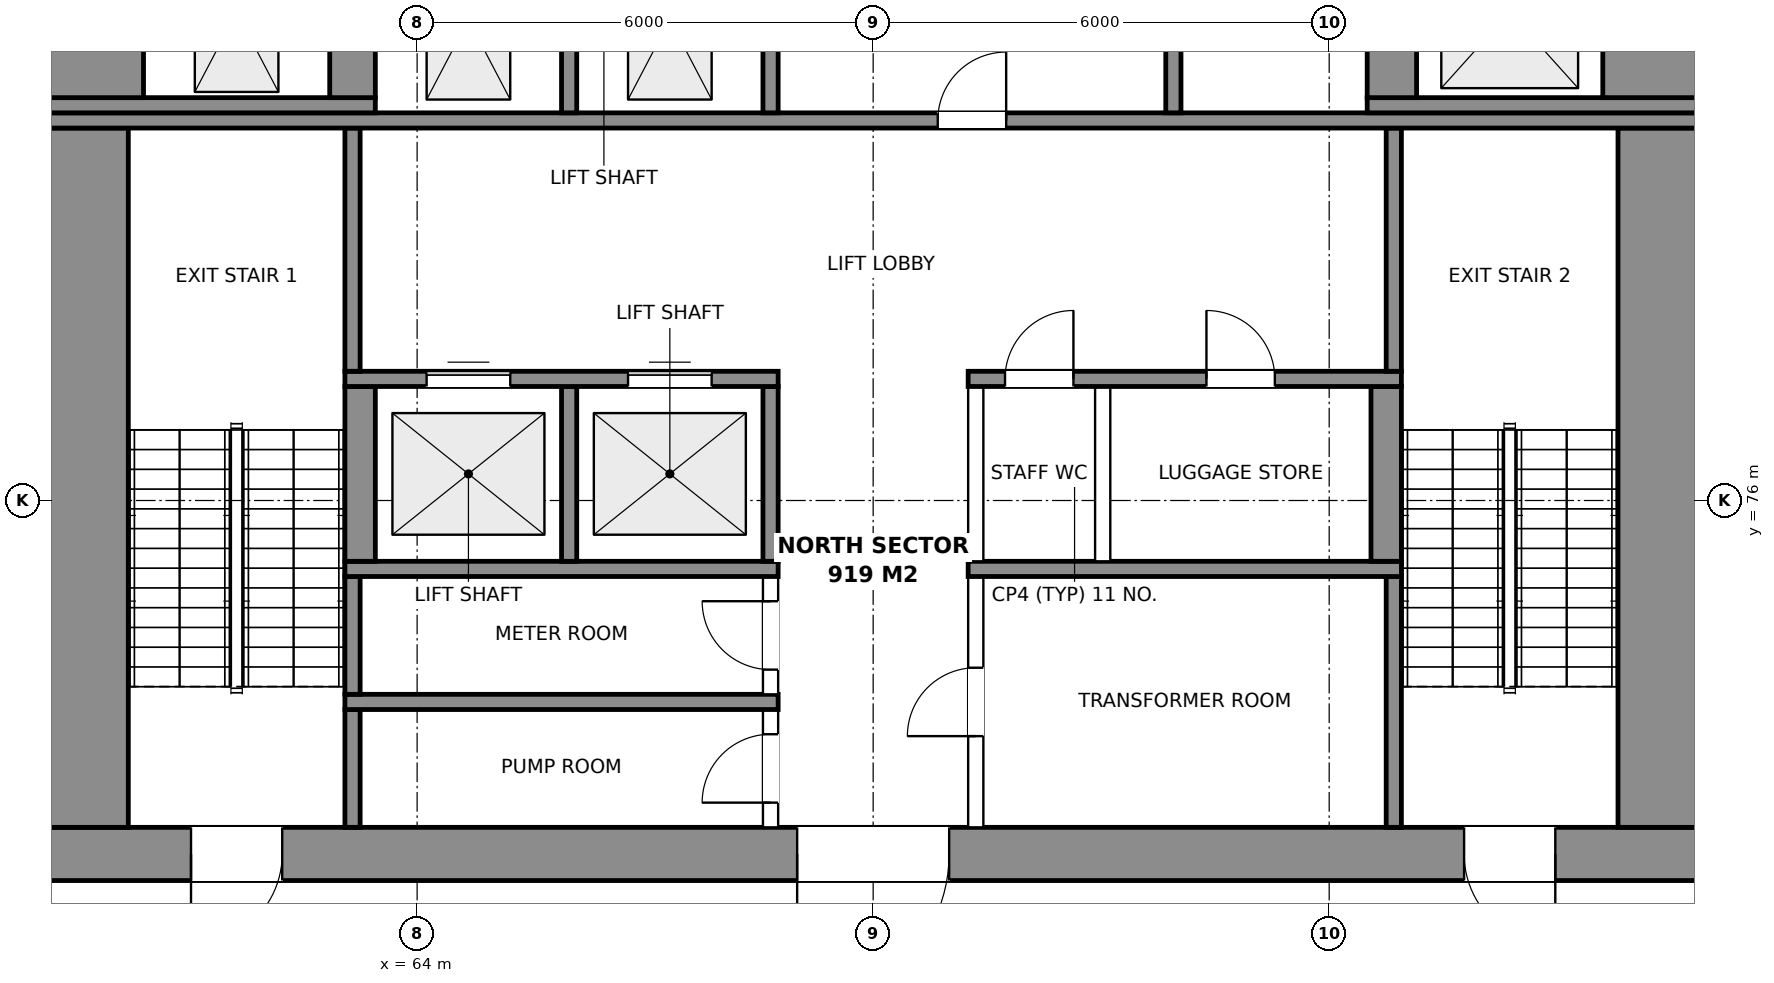
"""IFC4 building model, lengths in metres.
Left out: names, types, materials, properties, quantities, classifications, styles, units other than length and angle.
Written with IfcOpenShell. Run it as: python <this file> out.ifc"""

import sys

from ifc_helpers import new_model, si_unit, direction, frame, frame_2d, origin, place, context, subcontext, project, spatial, rectangle, extrude, element, fill, save


model = new_model("IFC4")
c1 = context("Model", 3, precision=1e-05, world=origin(), true_north=direction((0.0, 1.0)))
c2 = subcontext(c1, "Body", "Model", "MODEL_VIEW")
j1 = project(units=[si_unit("LENGTHUNIT", "METRE"), si_unit("PLANEANGLEUNIT", "RADIAN")], contexts=[c1])
p1 = place(None, origin())
s1 = spatial("IfcSite", under=j1, at=p1, CompositionType="ELEMENT")
p2 = place(p1, origin())
s2 = spatial("IfcBuilding", under=s1, at=p2, CompositionType="ELEMENT")
p3 = place(p2, frame((0.0, 0.0, 295.1)))
s3 = spatial("IfcBuildingStorey", under=s2, at=p3, CompositionType="ELEMENT", Elevation=295.1)
p4 = place(p3, frame((59.0, 71.35, 0.0), z_axis=(0.0, 0.0, 1.0), x_axis=(1.0, 0.0, 0.0)))
e1 = element("IfcWall", 1, at=p4, inside=s3, PredefinedType="SHEAR", context=c2, shape_type="SweptSolid", body=[
    extrude(rectangle(XDim=22.0, YDim=0.7, at=frame_2d((11.0, 0.0))), origin(), (0.0, 0.0, 1.0), 5.0),
])
p5 = place(p4, frame((2.025, 0.0, 0.0)))
e2 = element("IfcOpeningElement", 2, at=p5, cuts=e1, PredefinedType="OPENING", context=c2, shape_type="SweptSolid", body=[
    extrude(rectangle(XDim=1.2, YDim=2.1, at=frame_2d((0.6, 1.05))), frame((0.0, 0.36, 0.0), z_axis=(0.0, -1.0, 0.0), x_axis=(1.0, 0.0, 0.0)), (0.0, 0.0, 1.0), 0.72),
])
p6 = place(p4, frame((18.775, 0.0, 0.0)))
e3 = element("IfcOpeningElement", 3, at=p6, cuts=e1, PredefinedType="OPENING", context=c2, shape_type="SweptSolid", body=[
    extrude(rectangle(XDim=1.2, YDim=2.1, at=frame_2d((0.6, 1.05))), frame((0.0, 0.36, 0.0), z_axis=(0.0, -1.0, 0.0), x_axis=(1.0, 0.0, 0.0)), (0.0, 0.0, 1.0), 0.72),
])
p7 = place(p4, frame((10.0, 0.0, 0.0)))
e4 = element("IfcOpeningElement", 4, at=p7, cuts=e1, PredefinedType="OPENING", context=c2, shape_type="SweptSolid", body=[
    extrude(rectangle(XDim=2.0, YDim=2.1, at=frame_2d((1.0, 1.05))), frame((0.0, 0.36, 0.0), z_axis=(0.0, -1.0, 0.0), x_axis=(1.0, 0.0, 0.0)), (0.0, 0.0, 1.0), 0.72),
])
p8 = place(p3, frame((59.6, 71.7, 0.0), z_axis=(0.0, 0.0, 1.0), x_axis=(0.0, 1.0, 0.0)))
e5 = element("IfcWall", 5, at=p8, inside=s3, PredefinedType="SHEAR", context=c2, shape_type="SweptSolid", body=[
    extrude(rectangle(XDim=9.2, YDim=1.2, at=frame_2d((4.6, 0.0))), origin(), (0.0, 0.0, 1.0), 5.0),
])
p9 = place(p3, frame((63.15, 71.7, 0.0), z_axis=(0.0, 0.0, 1.0), x_axis=(0.0, 1.0, 0.0)))
e6 = element("IfcWall", 6, at=p9, inside=s3, PredefinedType="SHEAR", context=c2, shape_type="SweptSolid", body=[
    extrude(rectangle(XDim=1.55, YDim=0.2, at=frame_2d((0.775, 0.0))), origin(), (0.0, 0.0, 1.0), 5.0),
])
p10 = place(p3, frame((68.65, 71.7, 0.0), z_axis=(0.0, 0.0, 1.0), x_axis=(0.0, 1.0, 0.0)))
e7 = element("IfcWall", 7, at=p10, inside=s3, PredefinedType="PARTITIONING", context=c2, shape_type="SweptSolid", body=[
    extrude(rectangle(XDim=1.55, YDim=0.2, at=frame_2d((0.775, 0.0))), origin(), (0.0, 0.0, 1.0), 4.6),
])
p11 = place(p10, frame((0.325, 0.0, 0.0)))
e8 = element("IfcOpeningElement", 8, at=p11, cuts=e7, PredefinedType="OPENING", context=c2, shape_type="SweptSolid", body=[
    extrude(rectangle(XDim=0.9, YDim=2.1, at=frame_2d((0.45, 1.05))), frame((0.0, 0.11, 0.0), z_axis=(0.0, -1.0, 0.0), x_axis=(1.0, 0.0, 0.0)), (0.0, 0.0, 1.0), 0.22),
])
p12 = place(p3, frame((71.35, 71.7, 0.0), z_axis=(0.0, 0.0, 1.0), x_axis=(0.0, 1.0, 0.0)))
e9 = element("IfcWall", 9, at=p12, inside=s3, PredefinedType="PARTITIONING", context=c2, shape_type="SweptSolid", body=[
    extrude(rectangle(XDim=3.3, YDim=0.2, at=frame_2d((1.65, 0.0))), origin(), (0.0, 0.0, 1.0), 4.6),
])
p13 = place(p12, frame((1.2, 0.0, 0.0)))
e10 = element("IfcOpeningElement", 10, at=p13, cuts=e9, PredefinedType="OPENING", context=c2, shape_type="SweptSolid", body=[
    extrude(rectangle(XDim=0.9, YDim=2.1, at=frame_2d((0.45, 1.05))), frame((0.0, 0.11, 0.0), z_axis=(0.0, -1.0, 0.0), x_axis=(1.0, 0.0, 0.0)), (0.0, 0.0, 1.0), 0.22),
])
p14 = place(p3, frame((76.85, 71.7, 0.0), z_axis=(0.0, 0.0, 1.0), x_axis=(0.0, 1.0, 0.0)))
e11 = element("IfcWall", 11, at=p14, inside=s3, PredefinedType="SHEAR", context=c2, shape_type="SweptSolid", body=[
    extrude(rectangle(XDim=3.3, YDim=0.2, at=frame_2d((1.65, 0.0))), origin(), (0.0, 0.0, 1.0), 5.0),
])
p15 = place(p3, frame((80.4, 71.7, 0.0), z_axis=(0.0, 0.0, 1.0), x_axis=(0.0, 1.0, 0.0)))
e12 = element("IfcWall", 12, at=p15, inside=s3, PredefinedType="SHEAR", context=c2, shape_type="SweptSolid", body=[
    extrude(rectangle(XDim=9.2, YDim=1.2, at=frame_2d((4.6, 0.0))), origin(), (0.0, 0.0, 1.0), 5.0),
])
p16 = place(p3, frame((63.05, 73.35, 0.0), z_axis=(0.0, 0.0, 1.0), x_axis=(1.0, 0.0, 0.0)))
e13 = element("IfcWall", 13, at=p16, inside=s3, PredefinedType="SHEAR", context=c2, shape_type="SweptSolid", body=[
    extrude(rectangle(XDim=5.7, YDim=0.2, at=frame_2d((2.85, 0.0))), origin(), (0.0, 0.0, 1.0), 5.0),
])
p17 = place(p3, frame((63.15, 73.45, 0.0), z_axis=(0.0, 0.0, 1.0), x_axis=(0.0, 1.0, 0.0)))
e14 = element("IfcWall", 14, at=p17, inside=s3, PredefinedType="SHEAR", context=c2, shape_type="SweptSolid", body=[
    extrude(rectangle(XDim=1.55, YDim=0.2, at=frame_2d((0.775, 0.0))), origin(), (0.0, 0.0, 1.0), 5.0),
])
p18 = place(p3, frame((68.65, 73.45, 0.0), z_axis=(0.0, 0.0, 1.0), x_axis=(0.0, 1.0, 0.0)))
e15 = element("IfcWall", 15, at=p18, inside=s3, PredefinedType="PARTITIONING", context=c2, shape_type="SweptSolid", body=[
    extrude(rectangle(XDim=1.55, YDim=0.2, at=frame_2d((0.775, 0.0))), origin(), (0.0, 0.0, 1.0), 4.6),
])
p19 = place(p18, frame((0.325, 0.0, 0.0)))
e16 = element("IfcOpeningElement", 16, at=p19, cuts=e15, PredefinedType="OPENING", context=c2, shape_type="SweptSolid", body=[
    extrude(rectangle(XDim=0.9, YDim=2.1, at=frame_2d((0.45, 1.05))), frame((0.0, 0.11, 0.0), z_axis=(0.0, -1.0, 0.0), x_axis=(1.0, 0.0, 0.0)), (0.0, 0.0, 1.0), 0.22),
])
for number, where, z_axis, x_axis in (
    (17, (63.05, 75.1, 0.0), (0.0, 0.0, 1.0), (1.0, 0.0, 0.0)),
    (18, (71.25, 75.1, 0.0), (0.0, 0.0, 1.0), (1.0, 0.0, 0.0)),
):
    element("IfcWall", number, at=place(p3, frame(where, z_axis=z_axis, x_axis=x_axis)), inside=s3, PredefinedType="SHEAR", context=c2, shape_type="SweptSolid", body=[
        extrude(rectangle(XDim=5.7, YDim=0.2, at=frame_2d((2.85, 0.0))), origin(), (0.0, 0.0, 1.0), 5.0),
    ])
p20 = place(p3, frame((63.25, 75.2, 0.0), z_axis=(0.0, 0.0, 1.0), x_axis=(0.0, 1.0, 0.0)))
e19 = element("IfcWall", 19, at=p20, inside=s3, PredefinedType="SHEAR", context=c2, shape_type="SweptSolid", body=[
    extrude(rectangle(XDim=2.3, YDim=0.4, at=frame_2d((1.15, 0.0))), origin(), (0.0, 0.0, 1.0), 5.0),
])
for number, where, z_axis, x_axis in (
    (20, (66.0, 75.2, 0.0), (0.0, 0.0, 1.0), (0.0, 1.0, 0.0)),
    (21, (68.65, 75.2, 0.0), (0.0, 0.0, 1.0), (0.0, 1.0, 0.0)),
):
    element("IfcWall", number, at=place(p3, frame(where, z_axis=z_axis, x_axis=x_axis)), inside=s3, PredefinedType="SHEAR", context=c2, shape_type="SweptSolid", body=[
        extrude(rectangle(XDim=2.3, YDim=0.2, at=frame_2d((1.15, 0.0))), origin(), (0.0, 0.0, 1.0), 5.0),
    ])
for number, where, z_axis, x_axis in (
    (22, (71.35, 75.2, 0.0), (0.0, 0.0, 1.0), (0.0, 1.0, 0.0)),
    (23, (73.02, 75.2, 0.0), (0.0, 0.0, 1.0), (0.0, 1.0, 0.0)),
):
    element("IfcWall", number, at=place(p3, frame(where, z_axis=z_axis, x_axis=x_axis)), inside=s3, PredefinedType="PARTITIONING", context=c2, shape_type="SweptSolid", body=[
        extrude(rectangle(XDim=2.3, YDim=0.2, at=frame_2d((1.15, 0.0))), origin(), (0.0, 0.0, 1.0), 4.6),
    ])
p21 = place(p3, frame((76.75, 75.2, 0.0), z_axis=(0.0, 0.0, 1.0), x_axis=(0.0, 1.0, 0.0)))
e24 = element("IfcWall", 24, at=p21, inside=s3, PredefinedType="SHEAR", context=c2, shape_type="SweptSolid", body=[
    extrude(rectangle(XDim=2.3, YDim=0.4, at=frame_2d((1.15, 0.0))), origin(), (0.0, 0.0, 1.0), 5.0),
])
p22 = place(p3, frame((63.05, 77.6, 0.0), z_axis=(0.0, 0.0, 1.0), x_axis=(1.0, 0.0, 0.0)))
e25 = element("IfcWall", 25, at=p22, inside=s3, PredefinedType="SHEAR", context=c2, shape_type="SweptSolid", body=[
    extrude(rectangle(XDim=5.7, YDim=0.2, at=frame_2d((2.85, 0.0))), origin(), (0.0, 0.0, 1.0), 5.0),
])
p23 = place(p22, frame((1.075, 0.0, 0.0)))
e26 = element("IfcOpeningElement", 26, at=p23, cuts=e25, PredefinedType="OPENING", context=c2, shape_type="SweptSolid", body=[
    extrude(rectangle(XDim=1.1, YDim=2.1, at=frame_2d((0.55, 1.05))), frame((0.0, 0.11, 0.0), z_axis=(0.0, -1.0, 0.0), x_axis=(1.0, 0.0, 0.0)), (0.0, 0.0, 1.0), 0.22),
])
p24 = place(p22, frame((3.725, 0.0, 0.0)))
e27 = element("IfcOpeningElement", 27, at=p24, cuts=e25, PredefinedType="OPENING", context=c2, shape_type="SweptSolid", body=[
    extrude(rectangle(XDim=1.1, YDim=2.1, at=frame_2d((0.55, 1.05))), frame((0.0, 0.11, 0.0), z_axis=(0.0, -1.0, 0.0), x_axis=(1.0, 0.0, 0.0)), (0.0, 0.0, 1.0), 0.22),
])
p25 = place(p3, frame((71.25, 77.6, 0.0), z_axis=(0.0, 0.0, 1.0), x_axis=(1.0, 0.0, 0.0)))
e28 = element("IfcWall", 28, at=p25, inside=s3, PredefinedType="SHEAR", context=c2, shape_type="SweptSolid", body=[
    extrude(rectangle(XDim=5.7, YDim=0.2, at=frame_2d((2.85, 0.0))), origin(), (0.0, 0.0, 1.0), 5.0),
])
p26 = place(p25, frame((0.485, 0.0, 0.0)))
e29 = element("IfcOpeningElement", 29, at=p26, cuts=e28, PredefinedType="OPENING", context=c2, shape_type="SweptSolid", body=[
    extrude(rectangle(XDim=0.9, YDim=2.1, at=frame_2d((0.45, 1.05))), frame((0.0, 0.11, 0.0), z_axis=(0.0, -1.0, 0.0), x_axis=(1.0, 0.0, 0.0)), (0.0, 0.0, 1.0), 0.22),
])
p27 = place(p25, frame((3.135, 0.0, 0.0)))
e30 = element("IfcOpeningElement", 30, at=p27, cuts=e28, PredefinedType="OPENING", context=c2, shape_type="SweptSolid", body=[
    extrude(rectangle(XDim=0.9, YDim=2.1, at=frame_2d((0.45, 1.05))), frame((0.0, 0.11, 0.0), z_axis=(0.0, -1.0, 0.0), x_axis=(1.0, 0.0, 0.0)), (0.0, 0.0, 1.0), 0.22),
])
for number, where, z_axis, x_axis in (
    (31, (63.15, 77.7, 0.0), (0.0, 0.0, 1.0), (0.0, 1.0, 0.0)),
    (32, (76.85, 77.7, 0.0), (0.0, 0.0, 1.0), (0.0, 1.0, 0.0)),
):
    element("IfcWall", number, at=place(p3, frame(where, z_axis=z_axis, x_axis=x_axis)), inside=s3, PredefinedType="SHEAR", context=c2, shape_type="SweptSolid", body=[
        extrude(rectangle(XDim=3.2, YDim=0.2, at=frame_2d((1.6, 0.0))), origin(), (0.0, 0.0, 1.0), 5.0),
    ])
p28 = place(p3, frame((59.0, 81.0, 0.0), z_axis=(0.0, 0.0, 1.0), x_axis=(1.0, 0.0, 0.0)))
e33 = element("IfcWall", 33, at=p28, inside=s3, PredefinedType="SHEAR", context=c2, shape_type="SweptSolid", body=[
    extrude(rectangle(XDim=22.0, YDim=0.2, at=frame_2d((11.0, 0.0))), origin(), (0.0, 0.0, 1.0), 5.0),
])
p29 = place(p28, frame((11.85, 0.0, 0.0)))
e34 = element("IfcOpeningElement", 34, at=p29, cuts=e33, PredefinedType="OPENING", context=c2, shape_type="SweptSolid", body=[
    extrude(rectangle(XDim=0.9, YDim=2.1, at=frame_2d((0.45, 1.05))), frame((0.0, 0.11, 0.0), z_axis=(0.0, -1.0, 0.0), x_axis=(1.0, 0.0, 0.0)), (0.0, 0.0, 1.0), 0.22),
])
p30 = place(p3, frame((59.0, 81.2, 0.0), z_axis=(0.0, 0.0, 1.0), x_axis=(1.0, 0.0, 0.0)))
e35 = element("IfcWall", 35, at=p30, inside=s3, PredefinedType="SHEAR", context=c2, shape_type="SweptSolid", body=[
    extrude(rectangle(XDim=4.45, YDim=0.2, at=frame_2d((2.225, 0.0))), origin(), (0.0, 0.0, 1.0), 5.0),
])
for number, where, z_axis, x_axis in (
    (36, (66.0, 81.1, 0.0), (0.0, 0.0, 1.0), (0.0, 1.0, 0.0)),
    (37, (68.65, 81.1, 0.0), (0.0, 0.0, 1.0), (0.0, 1.0, 0.0)),
    (38, (73.95, 81.1, 0.0), (0.0, 0.0, 1.0), (0.0, 1.0, 0.0)),
):
    element("IfcWall", number, at=place(p3, frame(where, z_axis=z_axis, x_axis=x_axis)), inside=s3, PredefinedType="SHEAR", context=c2, shape_type="SweptSolid", body=[
        extrude(rectangle(XDim=2.45, YDim=0.2, at=frame_2d((1.225, 0.0))), origin(), (0.0, 0.0, 1.0), 5.0),
    ])
p31 = place(p3, frame((76.5, 81.2, 0.0), z_axis=(0.0, 0.0, 1.0), x_axis=(1.0, 0.0, 0.0)))
e39 = element("IfcWall", 39, at=p31, inside=s3, PredefinedType="SHEAR", context=c2, shape_type="SweptSolid", body=[
    extrude(rectangle(XDim=4.5, YDim=0.2, at=frame_2d((2.25, 0.0))), origin(), (0.0, 0.0, 1.0), 5.0),
])
p32 = place(p3, frame((59.7, 81.3, 0.0), z_axis=(0.0, 0.0, 1.0), x_axis=(0.0, 1.0, 0.0)))
e40 = element("IfcWall", 40, at=p32, inside=s3, PredefinedType="SHEAR", context=c2, shape_type="SweptSolid", body=[
    extrude(rectangle(XDim=2.25, YDim=1.4, at=frame_2d((1.125, 0.0))), origin(), (0.0, 0.0, 1.0), 5.0),
])
p33 = place(p3, frame((63.15, 81.3, 0.0), z_axis=(0.0, 0.0, 1.0), x_axis=(0.0, 1.0, 0.0)))
e41 = element("IfcWall", 41, at=p33, inside=s3, PredefinedType="SHEAR", context=c2, shape_type="SweptSolid", body=[
    extrude(rectangle(XDim=2.25, YDim=0.6, at=frame_2d((1.125, 0.0))), origin(), (0.0, 0.0, 1.0), 5.0),
])
p34 = place(p3, frame((76.825, 81.3, 0.0), z_axis=(0.0, 0.0, 1.0), x_axis=(0.0, 1.0, 0.0)))
e42 = element("IfcWall", 42, at=p34, inside=s3, PredefinedType="SHEAR", context=c2, shape_type="SweptSolid", body=[
    extrude(rectangle(XDim=2.25, YDim=0.65, at=frame_2d((1.125, 0.0))), origin(), (0.0, 0.0, 1.0), 5.0),
])
p35 = place(p3, frame((80.3, 81.3, 0.0), z_axis=(0.0, 0.0, 1.0), x_axis=(0.0, 1.0, 0.0)))
e43 = element("IfcWall", 43, at=p35, inside=s3, PredefinedType="SHEAR", context=c2, shape_type="SweptSolid", body=[
    extrude(rectangle(XDim=2.25, YDim=1.4, at=frame_2d((1.125, 0.0))), origin(), (0.0, 0.0, 1.0), 5.0),
])
p36 = place(p5, frame((1.2, 0.0, 0.0), z_axis=(0.0, 0.0, 1.0), x_axis=(-1.0, 0.0, 0.0)))
e44 = element("IfcDoor", 44, at=p36, inside=s3, OperationType="SINGLE_SWING_RIGHT", PredefinedType="DOOR", context=c2, shape_type="SweptSolid", body=[
    extrude(rectangle(XDim=1.2, YDim=2.1, at=frame_2d((0.6, 1.05))), frame((0.0, 0.025, 0.0), z_axis=(0.0, -1.0, 0.0), x_axis=(1.0, 0.0, 0.0)), (0.0, 0.0, 1.0), 0.05),
])
fill(e2, e44)
p37 = place(p6, frame((1.2, 0.0, 0.0), z_axis=(0.0, 0.0, 1.0), x_axis=(-1.0, 0.0, 0.0)))
e45 = element("IfcDoor", 45, at=p37, inside=s3, OperationType="SINGLE_SWING_LEFT", PredefinedType="DOOR", context=c2, shape_type="SweptSolid", body=[
    extrude(rectangle(XDim=1.2, YDim=2.1, at=frame_2d((0.6, 1.05))), frame((0.0, 0.025, 0.0), z_axis=(0.0, -1.0, 0.0), x_axis=(1.0, 0.0, 0.0)), (0.0, 0.0, 1.0), 0.05),
])
fill(e3, e45)
p38 = place(p7, frame((2.0, 0.0, 0.0), z_axis=(0.0, 0.0, 1.0), x_axis=(-1.0, 0.0, 0.0)))
e46 = element("IfcDoor", 46, at=p38, inside=s3, OperationType="DOUBLE_DOOR_SINGLE_SWING", PredefinedType="DOOR", context=c2, shape_type="SweptSolid", body=[
    extrude(rectangle(XDim=2.0, YDim=2.1, at=frame_2d((1.0, 1.05))), frame((0.0, 0.025, 0.0), z_axis=(0.0, -1.0, 0.0), x_axis=(1.0, 0.0, 0.0)), (0.0, 0.0, 1.0), 0.05),
])
fill(e4, e46)
p39 = place(p11, origin())
e47 = element("IfcDoor", 47, at=p39, inside=s3, OperationType="SINGLE_SWING_LEFT", PredefinedType="DOOR", context=c2, shape_type="SweptSolid", body=[
    extrude(rectangle(XDim=0.9, YDim=2.1, at=frame_2d((0.45, 1.05))), frame((0.0, 0.025, 0.0), z_axis=(0.0, -1.0, 0.0), x_axis=(1.0, 0.0, 0.0)), (0.0, 0.0, 1.0), 0.05),
])
fill(e8, e47)
p40 = place(p19, origin())
e48 = element("IfcDoor", 48, at=p40, inside=s3, OperationType="SINGLE_SWING_RIGHT", PredefinedType="DOOR", context=c2, shape_type="SweptSolid", body=[
    extrude(rectangle(XDim=0.9, YDim=2.1, at=frame_2d((0.45, 1.05))), frame((0.0, 0.025, 0.0), z_axis=(0.0, -1.0, 0.0), x_axis=(1.0, 0.0, 0.0)), (0.0, 0.0, 1.0), 0.05),
])
fill(e16, e48)
p41 = place(p13, origin())
e49 = element("IfcDoor", 49, at=p41, inside=s3, OperationType="SINGLE_SWING_LEFT", PredefinedType="DOOR", context=c2, shape_type="SweptSolid", body=[
    extrude(rectangle(XDim=0.9, YDim=2.1, at=frame_2d((0.45, 1.05))), frame((0.0, 0.025, 0.0), z_axis=(0.0, -1.0, 0.0), x_axis=(1.0, 0.0, 0.0)), (0.0, 0.0, 1.0), 0.05),
])
fill(e10, e49)
p42 = place(p23, origin())
e50 = element("IfcDoor", 50, at=p42, inside=s3, OperationType="DOUBLE_DOOR_SLIDING", PredefinedType="DOOR", context=c2, shape_type="SweptSolid", body=[
    extrude(rectangle(XDim=1.1, YDim=2.1, at=frame_2d((0.55, 1.05))), frame((0.0, 0.025, 0.0), z_axis=(0.0, -1.0, 0.0), x_axis=(1.0, 0.0, 0.0)), (0.0, 0.0, 1.0), 0.05),
])
fill(e26, e50)
p43 = place(p24, origin())
e51 = element("IfcDoor", 51, at=p43, inside=s3, OperationType="DOUBLE_DOOR_SLIDING", PredefinedType="DOOR", context=c2, shape_type="SweptSolid", body=[
    extrude(rectangle(XDim=1.1, YDim=2.1, at=frame_2d((0.55, 1.05))), frame((0.0, 0.025, 0.0), z_axis=(0.0, -1.0, 0.0), x_axis=(1.0, 0.0, 0.0)), (0.0, 0.0, 1.0), 0.05),
])
fill(e27, e51)
p44 = place(p26, origin())
e52 = element("IfcDoor", 52, at=p44, inside=s3, OperationType="SINGLE_SWING_RIGHT", PredefinedType="DOOR", context=c2, shape_type="SweptSolid", body=[
    extrude(rectangle(XDim=0.9, YDim=2.1, at=frame_2d((0.45, 1.05))), frame((0.0, 0.025, 0.0), z_axis=(0.0, -1.0, 0.0), x_axis=(1.0, 0.0, 0.0)), (0.0, 0.0, 1.0), 0.05),
])
fill(e29, e52)
p45 = place(p27, origin())
e53 = element("IfcDoor", 53, at=p45, inside=s3, OperationType="SINGLE_SWING_LEFT", PredefinedType="DOOR", context=c2, shape_type="SweptSolid", body=[
    extrude(rectangle(XDim=0.9, YDim=2.1, at=frame_2d((0.45, 1.05))), frame((0.0, 0.025, 0.0), z_axis=(0.0, -1.0, 0.0), x_axis=(1.0, 0.0, 0.0)), (0.0, 0.0, 1.0), 0.05),
])
fill(e30, e53)
p46 = place(p29, origin())
e54 = element("IfcDoor", 54, at=p46, inside=s3, OperationType="SINGLE_SWING_RIGHT", PredefinedType="DOOR", context=c2, shape_type="SweptSolid", body=[
    extrude(rectangle(XDim=0.9, YDim=2.1, at=frame_2d((0.45, 1.05))), frame((0.0, 0.025, 0.0), z_axis=(0.0, -1.0, 0.0), x_axis=(1.0, 0.0, 0.0)), (0.0, 0.0, 1.0), 0.05),
])
fill(e34, e54)
save(model, sys.argv[1])
